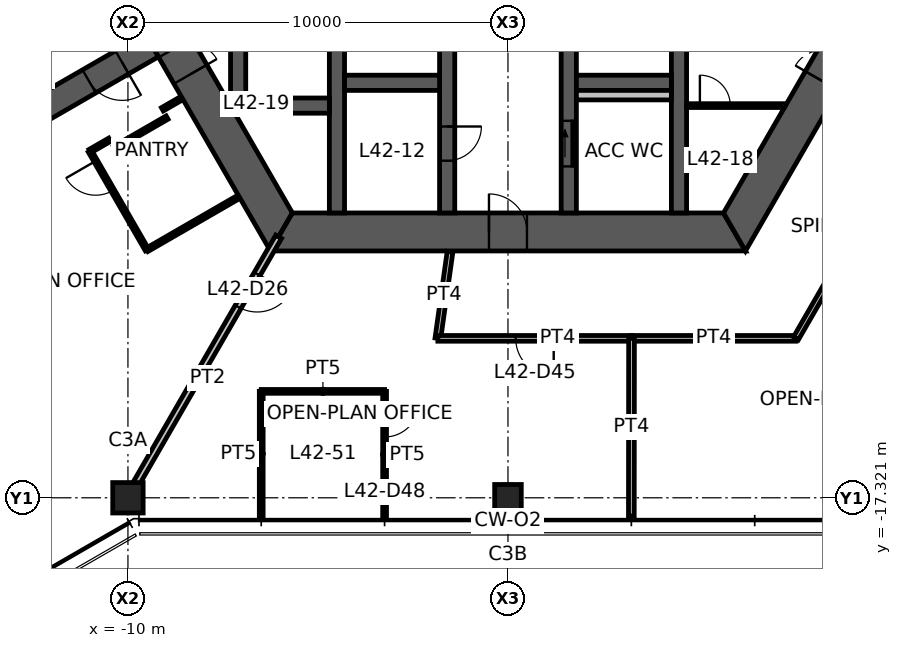
"""IFC4 building model, lengths in metres.
Left out: names, types, materials, properties, quantities, classifications, styles, units other than length and angle.
Written with IfcOpenShell. Run it as: python <this file> out.ifc"""

import sys

from ifc_helpers import new_model, si_unit, direction, frame, frame_2d, origin, origin_2d, place, context, subcontext, project, spatial, polyline, rectangle, hollow_rectangle, outline, extrude, element, fill, save


model = new_model("IFC4")
c1 = context("Model", 3, precision=1e-05, world=origin(), true_north=direction((0.0, 1.0)))
c2 = subcontext(c1, "Body", "Model", "MODEL_VIEW")
j1 = project(units=[si_unit("LENGTHUNIT", "METRE"), si_unit("PLANEANGLEUNIT", "RADIAN")], contexts=[c1])
p1 = place(None, origin())
s1 = spatial("IfcSite", under=j1, at=p1, CompositionType="ELEMENT")
p2 = place(p1, origin())
s2 = spatial("IfcBuilding", under=s1, at=p2, CompositionType="ELEMENT")
p3 = place(p2, frame((0.0, 0.0, 168.2)))
s3 = spatial("IfcBuildingStorey", under=s2, at=p3, CompositionType="ELEMENT", Elevation=168.2)
p4 = place(p3, frame((-10.0, -17.321, 0.0), z_axis=(0.0, 0.0, 1.0), x_axis=(1.0, 0.0, 0.0)))
e1 = element("IfcColumn", 1, at=p4, inside=s3, PredefinedType="COLUMN", context=c2, shape_type="SweptSolid", body=[
    extrude(hollow_rectangle(XDim=0.8, YDim=0.8, WallThickness=0.045, at=origin_2d()), origin(), (0.0, 0.0, 1.0), 3.9),
])
p5 = place(p3, frame((0.0, -17.321, 0.0), z_axis=(0.0, 0.0, 1.0), x_axis=(1.0, 0.0, 0.0)))
e2 = element("IfcColumn", 2, at=p5, inside=s3, PredefinedType="COLUMN", context=c2, shape_type="SweptSolid", body=[
    extrude(hollow_rectangle(XDim=0.7, YDim=0.7, WallThickness=0.036, at=origin_2d()), origin(), (0.0, 0.0, 1.0), 3.9),
])
p6 = place(p3, frame((-11.922, 0.0, 0.0), z_axis=(0.0, 0.0, 1.0), x_axis=(0.500004296715, -0.866022923061, 0.0)))
e3 = element("IfcWall", 3, at=p6, inside=s3, PredefinedType="SHEAR", context=c2, shape_type="SweptSolid", body=[
    extrude(outline(polyline([(-0.289, -0.5), (6.331, -0.5), (7.131, -0.5), (12.211, -0.5), (11.634, 0.5), (7.131, 0.5), (6.331, 0.5), (0.289, 0.5), (-0.289, -0.5)])), origin(), (0.0, 0.0, 1.0), 3.9),
])
p7 = place(p6, frame((6.331, 0.0, 0.0)))
e4 = element("IfcOpeningElement", 4, at=p7, cuts=e3, PredefinedType="OPENING", context=c2, shape_type="SweptSolid", body=[
    extrude(rectangle(XDim=0.8, YDim=2.1, at=frame_2d((0.4, 1.05))), frame((0.0, 0.51, 0.0), z_axis=(0.0, -1.0, 0.0), x_axis=(1.0, 0.0, 0.0)), (0.0, 0.0, 1.0), 1.02),
])
p8 = place(p3, frame((-5.961, -10.325, 0.0), z_axis=(0.0, 0.0, 1.0), x_axis=(1.0, 0.0, 0.0)))
e5 = element("IfcWall", 5, at=p8, inside=s3, PredefinedType="SHEAR", context=c2, shape_type="SweptSolid", body=[
    extrude(outline(polyline([(-0.289, -0.5), (5.461, -0.5), (6.461, -0.5), (12.211, -0.5), (11.634, 0.5), (6.461, 0.5), (5.461, 0.5), (0.289, 0.5), (-0.289, -0.5)])), origin(), (0.0, 0.0, 1.0), 3.9),
])
p9 = place(p8, frame((5.461, 0.0, 0.0)))
e6 = element("IfcOpeningElement", 6, at=p9, cuts=e5, PredefinedType="OPENING", context=c2, shape_type="SweptSolid", body=[
    extrude(rectangle(XDim=1.0, YDim=2.1, at=frame_2d((0.5, 1.05))), frame((0.0, 0.51, 0.0), z_axis=(0.0, -1.0, 0.0), x_axis=(1.0, 0.0, 0.0)), (0.0, 0.0, 1.0), 1.02),
])
p10 = place(p3, frame((5.961, -10.325, 0.0), z_axis=(0.0, 0.0, 1.0), x_axis=(0.500004296715, 0.866022923061, 0.0)))
e7 = element("IfcWall", 7, at=p10, inside=s3, PredefinedType="SHEAR", context=c2, shape_type="SweptSolid", body=[
    extrude(outline(polyline([(-0.289, -0.5), (4.594, -0.5), (5.394, -0.5), (12.211, -0.5), (11.634, 0.5), (5.394, 0.5), (4.594, 0.5), (0.289, 0.5), (-0.289, -0.5)])), origin(), (0.0, 0.0, 1.0), 3.9),
])
p11 = place(p10, frame((4.594, 0.0, 0.0)))
e8 = element("IfcOpeningElement", 8, at=p11, cuts=e7, PredefinedType="OPENING", context=c2, shape_type="SweptSolid", body=[
    extrude(rectangle(XDim=0.8, YDim=2.1, at=frame_2d((0.4, 1.05))), frame((0.0, 0.51, 0.0), z_axis=(0.0, -1.0, 0.0), x_axis=(1.0, 0.0, 0.0)), (0.0, 0.0, 1.0), 1.02),
])
p12 = place(p3, frame((-9.375, -5.413, 0.0), z_axis=(0.0, 0.0, 1.0), x_axis=(-0.866032377459, -0.499987921047, 0.0)))
e9 = element("IfcWall", 9, at=p12, inside=s3, PredefinedType="SHEAR", context=c2, shape_type="SweptSolid", body=[
    extrude(rectangle(XDim=7.696, YDim=0.7, at=frame_2d((3.848, 0.0))), origin(), (0.0, 0.0, 1.0), 3.9),
])
p13 = place(p12, frame((0.9, 0.0, 0.0)))
e10 = element("IfcOpeningElement", 10, at=p13, cuts=e9, PredefinedType="OPENING", context=c2, shape_type="SweptSolid", body=[
    extrude(rectangle(XDim=1.0, YDim=2.1, at=frame_2d((0.5, 1.05))), frame((0.0, 0.36, 0.0), z_axis=(0.0, -1.0, 0.0), x_axis=(1.0, 0.0, 0.0)), (0.0, 0.0, 1.0), 0.72),
])
p14 = place(p3, frame((-1.6, -3.8, 0.0), z_axis=(0.0, 0.0, 1.0), x_axis=(0.0, -1.0, 0.0)))
e11 = element("IfcWall", 11, at=p14, inside=s3, PredefinedType="SHEAR", context=c2, shape_type="SweptSolid", body=[
    extrude(rectangle(XDim=6.025, YDim=0.4, at=frame_2d((3.012, 0.0))), origin(), (0.0, 0.0, 1.0), 3.9),
])
p15 = place(p14, frame((3.75, 0.0, 0.0)))
e12 = element("IfcOpeningElement", 12, at=p15, cuts=e11, PredefinedType="OPENING", context=c2, shape_type="SweptSolid", body=[
    extrude(rectangle(XDim=0.9, YDim=2.1, at=frame_2d((0.45, 1.05))), frame((0.0, 0.21, 0.0), z_axis=(0.0, -1.0, 0.0), x_axis=(1.0, 0.0, 0.0)), (0.0, 0.0, 1.0), 0.42),
])
p16 = place(p3, frame((1.6, -3.8, 0.0), z_axis=(0.0, 0.0, 1.0), x_axis=(0.0, -1.0, 0.0)))
e13 = element("IfcWall", 13, at=p16, inside=s3, PredefinedType="SHEAR", context=c2, shape_type="SweptSolid", body=[
    extrude(rectangle(XDim=6.025, YDim=0.4, at=frame_2d((3.012, 0.0))), origin(), (0.0, 0.0, 1.0), 3.9),
])
p17 = place(p16, frame((3.6, 0.0, 0.0)))
e14 = element("IfcOpeningElement", 14, at=p17, cuts=e13, PredefinedType="OPENING", context=c2, shape_type="SweptSolid", body=[
    extrude(rectangle(XDim=1.2, YDim=2.1, at=frame_2d((0.6, 1.05))), frame((0.0, 0.21, 0.0), z_axis=(0.0, -1.0, 0.0), x_axis=(1.0, 0.0, 0.0)), (0.0, 0.0, 1.0), 0.42),
])
for number, where, z_axis, x_axis in (
    (15, (-4.5, -3.8, 0.0), (0.0, 0.0, 1.0), (0.0, -1.0, 0.0)),
    (16, (4.5, -3.8, 0.0), (0.0, 0.0, 1.0), (0.0, -1.0, 0.0)),
):
    element("IfcWall", number, at=place(p3, frame(where, z_axis=z_axis, x_axis=x_axis)), inside=s3, PredefinedType="SHEAR", context=c2, shape_type="SweptSolid", body=[
        extrude(rectangle(XDim=6.025, YDim=0.4, at=frame_2d((3.012, 0.0))), origin(), (0.0, 0.0, 1.0), 3.9),
    ])
for number, where, z_axis, x_axis in (
    (17, (-4.3, -6.4, 0.0), (0.0, 0.0, 1.0), (1.0, 0.0, 0.0)),
    (18, (1.8, -6.4, 0.0), (0.0, 0.0, 1.0), (1.0, 0.0, 0.0)),
):
    element("IfcWall", number, at=place(p3, frame(where, z_axis=z_axis, x_axis=x_axis)), inside=s3, PredefinedType="SHEAR", context=c2, shape_type="SweptSolid", body=[
        extrude(rectangle(XDim=2.5, YDim=0.4, at=frame_2d((1.25, 0.0))), origin(), (0.0, 0.0, 1.0), 3.9),
    ])
p18 = place(p3, frame((-6.9, -7.0, 0.0), z_axis=(0.0, 0.0, 1.0), x_axis=(1.0, 0.0, 0.0)))
e19 = element("IfcWall", 19, at=p18, inside=s3, PredefinedType="SHEAR", context=c2, shape_type="SweptSolid", body=[
    extrude(rectangle(XDim=2.2, YDim=0.4, at=frame_2d((1.1, 0.0))), origin(), (0.0, 0.0, 1.0), 3.9),
])
p19 = place(p3, frame((-7.1, -3.8, 0.0), z_axis=(0.0, 0.0, 1.0), x_axis=(0.0, -1.0, 0.0)))
e20 = element("IfcWall", 20, at=p19, inside=s3, PredefinedType="SHEAR", context=c2, shape_type="SweptSolid", body=[
    extrude(outline(polyline([(0.0, -0.2), (3.206, -0.2), (3.4, 0.0), (3.4, 0.2), (0.0, 0.2), (0.0, -0.2)])), origin(), (0.0, 0.0, 1.0), 3.9),
])
p20 = place(p3, frame((1.8, -6.725, 0.0), z_axis=(0.0, 0.0, 1.0), x_axis=(1.0, 0.0, 0.0)))
e21 = element("IfcWall", 21, at=p20, inside=s3, PredefinedType="PLUMBINGWALL", context=c2, shape_type="SweptSolid", body=[
    extrude(rectangle(XDim=2.5, YDim=0.25, at=frame_2d((1.25, 0.0))), origin(), (0.0, 0.0, 1.0), 3.9),
])
p21 = place(p3, frame((4.7, -7.0, 0.0), z_axis=(0.0, 0.0, 1.0), x_axis=(1.0, 0.0, 0.0)))
e22 = element("IfcWall", 22, at=p21, inside=s3, PredefinedType="PARTITIONING", context=c2, shape_type="SweptSolid", body=[
    extrude(outline(polyline([(0.0, -0.05), (0.35, -0.05), (1.15, -0.05), (2.575, -0.05), (2.604, 0.0), (2.609, 0.05), (1.15, 0.05), (0.35, 0.05), (0.0, 0.05), (0.0, -0.05)])), origin(), (0.0, 0.0, 1.0), 2.95),
])
p22 = place(p21, frame((0.35, 0.0, 0.0)))
e23 = element("IfcOpeningElement", 23, at=p22, cuts=e22, PredefinedType="OPENING", context=c2, shape_type="SweptSolid", body=[
    extrude(rectangle(XDim=0.8, YDim=2.1, at=frame_2d((0.4, 1.05))), frame((0.0, 0.06, 0.0), z_axis=(0.0, -1.0, 0.0), x_axis=(1.0, 0.0, 0.0)), (0.0, 0.0, 1.0), 0.12),
])
p23 = place(p3, frame((-6.035, -10.453, 0.0), z_axis=(0.0, 0.0, 1.0), x_axis=(-0.499989830942, -0.866031274813, 0.0)))
e24 = element("IfcWall", 24, at=p23, inside=s3, PredefinedType="PARTITIONING", context=c2, shape_type="SweptSolid", body=[
    extrude(rectangle(XDim=7.93, YDim=0.175, at=frame_2d((3.965, 0.0))), origin(), (0.0, 0.0, 1.0), 3.05),
])
p24 = place(p23, frame((1.13, 0.0, 0.0)))
e25 = element("IfcOpeningElement", 25, at=p24, cuts=e24, PredefinedType="OPENING", context=c2, shape_type="SweptSolid", body=[
    extrude(rectangle(XDim=1.0, YDim=2.1, at=frame_2d((0.5, 1.05))), frame((0.0, 0.098, 0.0), z_axis=(0.0, -1.0, 0.0), x_axis=(1.0, 0.0, 0.0)), (0.0, 0.0, 1.0), 0.195),
])
p25 = place(p3, frame((-11.0, -8.198, 0.0), z_axis=(0.0, 0.0, 1.0), x_axis=(0.866131372301, 0.499816412211, 0.0)))
e26 = element("IfcWall", 26, at=p25, inside=s3, PredefinedType="PARTITIONING", context=c2, shape_type="SweptSolid", body=[
    extrude(rectangle(XDim=0.6, YDim=0.1, at=frame_2d((0.3, 0.0))), origin(), (0.0, 0.0, 1.0), 2.95),
])
p26 = place(p3, frame((-10.355, -8.115, 0.0), z_axis=(0.0, 0.0, 1.0), x_axis=(0.866094119867, 0.499880961361, 0.0)))
e27 = element("IfcWall", 27, at=p26, inside=s3, PredefinedType="PARTITIONING", context=c2, shape_type="SweptSolid", body=[
    extrude(rectangle(XDim=1.6, YDim=0.1, at=frame_2d((0.8, 0.0))), origin(), (0.0, 0.0, 1.0), 2.95),
])
p27 = place(p3, frame((-9.5, -10.796, 0.0), z_axis=(0.0, 0.0, 1.0), x_axis=(-0.499990139034, 0.866031096941, 0.0)))
e28 = element("IfcWall", 28, at=p27, inside=s3, PredefinedType="PARTITIONING", context=c2, shape_type="SweptSolid", body=[
    extrude(rectangle(XDim=3.0, YDim=0.1, at=frame_2d((1.5, 0.0))), origin(), (0.0, 0.0, 1.0), 2.95),
])
p28 = place(p27, frame((1.8, 0.0, 0.0)))
e29 = element("IfcOpeningElement", 29, at=p28, cuts=e28, PredefinedType="OPENING", context=c2, shape_type="SweptSolid", body=[
    extrude(rectangle(XDim=0.9, YDim=2.1, at=frame_2d((0.45, 1.05))), frame((0.0, 0.06, 0.0), z_axis=(0.0, -1.0, 0.0), x_axis=(1.0, 0.0, 0.0)), (0.0, 0.0, 1.0), 0.12),
])
p29 = place(p3, frame((-9.094, -7.098, 0.0), z_axis=(0.0, 0.0, 1.0), x_axis=(0.865954211699, 0.50012328804, 0.0)))
e30 = element("IfcWall", 30, at=p29, inside=s3, PredefinedType="PARTITIONING", context=c2, shape_type="SweptSolid", body=[
    extrude(rectangle(XDim=0.58, YDim=0.1, at=frame_2d((0.29, 0.0))), origin(), (0.0, 0.0, 1.0), 2.95),
])
p30 = place(p3, frame((-7.092, -9.406, 0.0), z_axis=(0.0, 0.0, 1.0), x_axis=(-0.86603494908, -0.499983466698, 0.0)))
e31 = element("IfcWall", 31, at=p30, inside=s3, PredefinedType="PARTITIONING", context=c2, shape_type="SweptSolid", body=[
    extrude(rectangle(XDim=2.78, YDim=0.1, at=frame_2d((1.39, 0.0))), origin(), (0.0, 0.0, 1.0), 2.95),
])
p31 = place(p3, frame((7.578, -13.125, 0.0), z_axis=(0.0, 0.0, 1.0), x_axis=(-1.0, 0.0, 0.0)))
e32 = element("IfcWall", 32, at=p31, inside=s3, PredefinedType="PARTITIONING", context=c2, shape_type="SweptSolid", body=[
    extrude(rectangle(XDim=4.336, YDim=0.15, at=frame_2d((2.168, 0.0))), origin(), (0.0, 0.0, 1.0), 2.95),
])
p32 = place(p3, frame((9.992, -8.944, 0.0), z_axis=(0.0, 0.0, 1.0), x_axis=(-0.500033248206, -0.866006207073, 0.0)))
e33 = element("IfcWall", 33, at=p32, inside=s3, PredefinedType="PARTITIONING", context=c2, shape_type="SweptSolid", body=[
    extrude(rectangle(XDim=4.828, YDim=0.15, at=frame_2d((2.414, 0.0))), origin(), (0.0, 0.0, 1.0), 2.95),
])
p33 = place(p3, frame((-1.844, -13.125, 0.0), z_axis=(0.0, 0.0, 1.0), x_axis=(0.139119980631, 0.990275532864, 0.0)))
e34 = element("IfcWall", 34, at=p33, inside=s3, PredefinedType="PARTITIONING", context=c2, shape_type="SweptSolid", body=[
    extrude(rectangle(XDim=2.302, YDim=0.15, at=frame_2d((1.151, 0.0))), origin(), (0.0, 0.0, 1.0), 2.95),
])
p34 = place(p3, frame((3.251, -13.125, 0.0), z_axis=(0.0, 0.0, 1.0), x_axis=(-1.0, 0.0, 0.0)))
e35 = element("IfcWall", 35, at=p34, inside=s3, PredefinedType="PARTITIONING", context=c2, shape_type="SweptSolid", body=[
    extrude(rectangle(XDim=5.096, YDim=0.15, at=frame_2d((2.548, 0.0))), origin(), (0.0, 0.0, 1.0), 2.95),
])
p35 = place(p34, frame((2.048, 0.0, 0.0)))
e36 = element("IfcOpeningElement", 36, at=p35, cuts=e35, PredefinedType="OPENING", context=c2, shape_type="SweptSolid", body=[
    extrude(rectangle(XDim=1.0, YDim=2.1, at=frame_2d((0.5, 1.05))), frame((0.0, 0.085, 0.0), z_axis=(0.0, -1.0, 0.0), x_axis=(1.0, 0.0, 0.0)), (0.0, 0.0, 1.0), 0.17),
])
p36 = place(p3, frame((-6.493, -17.801, 0.0), z_axis=(0.0, 0.0, 1.0), x_axis=(0.0, 1.0, 0.0)))
e37 = element("IfcWall", 37, at=p36, inside=s3, PredefinedType="PARTITIONING", context=c2, shape_type="SweptSolid", body=[
    extrude(rectangle(XDim=3.28, YDim=0.1, at=frame_2d((1.64, 0.0))), origin(), (0.0, 0.0, 1.0), 2.95),
])
p37 = place(p3, frame((-6.493, -14.521, 0.0), z_axis=(0.0, 0.0, 1.0), x_axis=(1.0, 0.0, 0.0)))
e38 = element("IfcWall", 38, at=p37, inside=s3, PredefinedType="PARTITIONING", context=c2, shape_type="SweptSolid", body=[
    extrude(rectangle(XDim=3.247, YDim=0.1, at=frame_2d((1.623, 0.0))), origin(), (0.0, 0.0, 1.0), 2.95),
])
p38 = place(p3, frame((-3.246, -14.521, 0.0), z_axis=(0.0, 0.0, 1.0), x_axis=(0.0, -1.0, 0.0)))
e39 = element("IfcWall", 39, at=p38, inside=s3, PredefinedType="PARTITIONING", context=c2, shape_type="SweptSolid", body=[
    extrude(rectangle(XDim=3.33, YDim=0.1, at=frame_2d((1.665, 0.0))), origin(), (0.0, 0.0, 1.0), 2.95),
])
p39 = place(p38, frame((0.3, 0.0, 0.0)))
e40 = element("IfcOpeningElement", 40, at=p39, cuts=e39, PredefinedType="OPENING", context=c2, shape_type="SweptSolid", body=[
    extrude(rectangle(XDim=0.9, YDim=2.1, at=frame_2d((0.45, 1.05))), frame((0.0, 0.06, 0.0), z_axis=(0.0, -1.0, 0.0), x_axis=(1.0, 0.0, 0.0)), (0.0, 0.0, 1.0), 0.12),
])
p40 = place(p3, frame((3.246, -17.801, 0.0), z_axis=(0.0, 0.0, 1.0), x_axis=(0.001096662352, 0.999999398666, 0.0)))
e41 = element("IfcWall", 41, at=p40, inside=s3, PredefinedType="PARTITIONING", context=c2, shape_type="SweptSolid", body=[
    extrude(rectangle(XDim=4.675, YDim=0.15, at=frame_2d((2.337, 0.0))), origin(), (0.0, 0.0, 1.0), 2.95),
])
p41 = place(p9, origin())
e42 = element("IfcDoor", 42, at=p41, inside=s3, OperationType="SINGLE_SWING_LEFT", PredefinedType="DOOR", context=c2, shape_type="SweptSolid", body=[
    extrude(rectangle(XDim=1.0, YDim=2.1, at=frame_2d((0.5, 1.05))), frame((0.0, 0.025, 0.0), z_axis=(0.0, -1.0, 0.0), x_axis=(1.0, 0.0, 0.0)), (0.0, 0.0, 1.0), 0.05),
])
fill(e6, e42)
p42 = place(p11, origin())
e43 = element("IfcDoor", 43, at=p42, inside=s3, OperationType="SINGLE_SWING_LEFT", PredefinedType="DOOR", context=c2, shape_type="SweptSolid", body=[
    extrude(rectangle(XDim=0.8, YDim=2.1, at=frame_2d((0.4, 1.05))), frame((0.0, 0.025, 0.0), z_axis=(0.0, -1.0, 0.0), x_axis=(1.0, 0.0, 0.0)), (0.0, 0.0, 1.0), 0.05),
])
fill(e8, e43)
p43 = place(p7, origin())
e44 = element("IfcDoor", 44, at=p43, inside=s3, OperationType="SINGLE_SWING_RIGHT", PredefinedType="DOOR", context=c2, shape_type="SweptSolid", body=[
    extrude(rectangle(XDim=0.8, YDim=2.1, at=frame_2d((0.4, 1.05))), frame((0.0, 0.025, 0.0), z_axis=(0.0, -1.0, 0.0), x_axis=(1.0, 0.0, 0.0)), (0.0, 0.0, 1.0), 0.05),
])
fill(e4, e44)
p44 = place(p17, origin())
e45 = element("IfcDoor", 45, at=p44, inside=s3, OperationType="SLIDING_TO_LEFT", PredefinedType="DOOR", context=c2, shape_type="SweptSolid", body=[
    extrude(rectangle(XDim=1.2, YDim=2.1, at=frame_2d((0.6, 1.05))), frame((0.0, 0.025, 0.0), z_axis=(0.0, -1.0, 0.0), x_axis=(1.0, 0.0, 0.0)), (0.0, 0.0, 1.0), 0.05),
])
fill(e14, e45)
p45 = place(p15, origin())
e46 = element("IfcDoor", 46, at=p45, inside=s3, OperationType="SINGLE_SWING_LEFT", PredefinedType="DOOR", context=c2, shape_type="SweptSolid", body=[
    extrude(rectangle(XDim=0.9, YDim=2.1, at=frame_2d((0.45, 1.05))), frame((0.0, 0.025, 0.0), z_axis=(0.0, -1.0, 0.0), x_axis=(1.0, 0.0, 0.0)), (0.0, 0.0, 1.0), 0.05),
])
fill(e12, e46)
p46 = place(p13, origin())
e47 = element("IfcDoor", 47, at=p46, inside=s3, OperationType="SINGLE_SWING_LEFT", PredefinedType="DOOR", context=c2, shape_type="SweptSolid", body=[
    extrude(rectangle(XDim=1.0, YDim=2.1, at=frame_2d((0.5, 1.05))), frame((0.0, 0.025, 0.0), z_axis=(0.0, -1.0, 0.0), x_axis=(1.0, 0.0, 0.0)), (0.0, 0.0, 1.0), 0.05),
])
fill(e10, e47)
p47 = place(p22, origin())
e48 = element("IfcDoor", 48, at=p47, inside=s3, OperationType="SINGLE_SWING_LEFT", PredefinedType="DOOR", context=c2, shape_type="SweptSolid", body=[
    extrude(rectangle(XDim=0.8, YDim=2.1, at=frame_2d((0.4, 1.05))), frame((0.0, 0.025, 0.0), z_axis=(0.0, -1.0, 0.0), x_axis=(1.0, 0.0, 0.0)), (0.0, 0.0, 1.0), 0.05),
])
fill(e23, e48)
p48 = place(p24, origin())
e49 = element("IfcDoor", 49, at=p48, inside=s3, OperationType="SINGLE_SWING_LEFT", PredefinedType="DOOR", context=c2, shape_type="SweptSolid", body=[
    extrude(rectangle(XDim=1.0, YDim=2.1, at=frame_2d((0.5, 1.05))), frame((0.0, 0.025, 0.0), z_axis=(0.0, -1.0, 0.0), x_axis=(1.0, 0.0, 0.0)), (0.0, 0.0, 1.0), 0.05),
])
fill(e25, e49)
p49 = place(p28, origin())
e50 = element("IfcDoor", 50, at=p49, inside=s3, OperationType="SINGLE_SWING_RIGHT", PredefinedType="DOOR", context=c2, shape_type="SweptSolid", body=[
    extrude(rectangle(XDim=0.9, YDim=2.1, at=frame_2d((0.45, 1.05))), frame((0.0, 0.025, 0.0), z_axis=(0.0, -1.0, 0.0), x_axis=(1.0, 0.0, 0.0)), (0.0, 0.0, 1.0), 0.05),
])
fill(e29, e50)
p50 = place(p35, origin())
e51 = element("IfcDoor", 51, at=p50, inside=s3, OperationType="SINGLE_SWING_LEFT", PredefinedType="DOOR", context=c2, shape_type="SweptSolid", body=[
    extrude(rectangle(XDim=1.0, YDim=2.1, at=frame_2d((0.5, 1.05))), frame((0.0, 0.025, 0.0), z_axis=(0.0, -1.0, 0.0), x_axis=(1.0, 0.0, 0.0)), (0.0, 0.0, 1.0), 0.05),
])
fill(e36, e51)
p51 = place(p39, origin())
e52 = element("IfcDoor", 52, at=p51, inside=s3, OperationType="SINGLE_SWING_LEFT", PredefinedType="DOOR", context=c2, shape_type="SweptSolid", body=[
    extrude(rectangle(XDim=0.9, YDim=2.1, at=frame_2d((0.45, 1.05))), frame((0.0, 0.025, 0.0), z_axis=(0.0, -1.0, 0.0), x_axis=(1.0, 0.0, 0.0)), (0.0, 0.0, 1.0), 0.05),
])
fill(e40, e52)
save(model, sys.argv[1])
